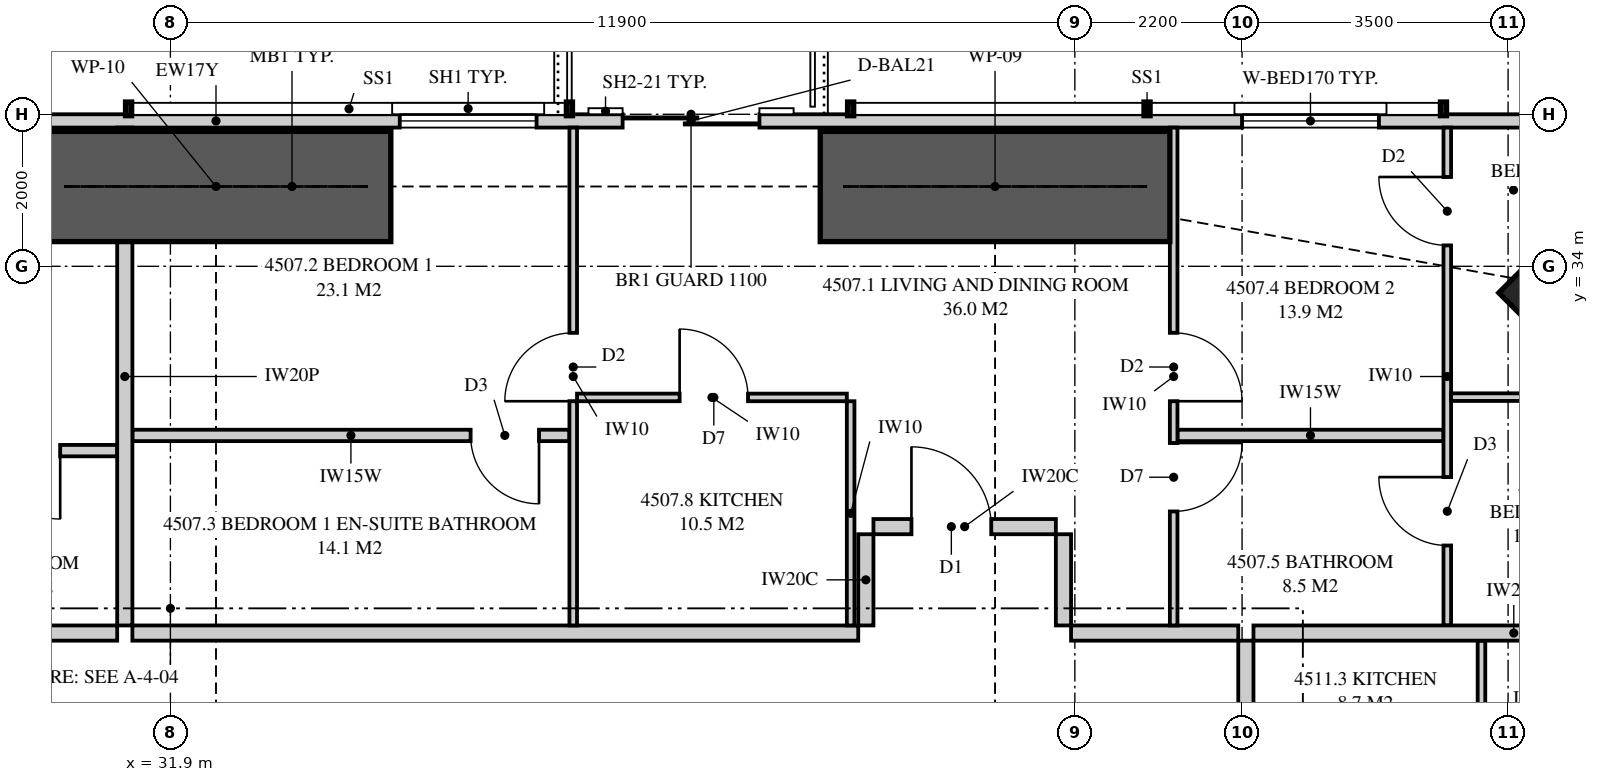
"""IFC4 building model, lengths in metres.
Left out: names, types, materials, properties, quantities, classifications, styles, units other than length and angle.
Written with IfcOpenShell. Run it as: python <this file> out.ifc"""

import sys

from ifc_helpers import new_model, si_unit, direction, frame, frame_2d, origin, origin_2d, place, context, subcontext, project, spatial, polyline, rectangle, outline, extrude, element, fill, save


model = new_model("IFC4")
c1 = context("Model", 3, precision=1e-05, world=origin(), true_north=direction((0.0, 1.0)))
c2 = subcontext(c1, "Body", "Model", "MODEL_VIEW")
j1 = project(units=[si_unit("LENGTHUNIT", "METRE"), si_unit("PLANEANGLEUNIT", "RADIAN")], contexts=[c1])
p1 = place(None, origin())
s1 = spatial("IfcSite", under=j1, at=p1, CompositionType="ELEMENT")
p2 = place(p1, origin())
s2 = spatial("IfcBuilding", under=s1, at=p2, CompositionType="ELEMENT")
p3 = place(p2, frame((0.0, 0.0, 167.75)))
s3 = spatial("IfcBuildingStorey", under=s2, at=p3, CompositionType="ELEMENT", Elevation=167.75)
p4 = place(p3, frame((50.652, 33.652, 0.0), z_axis=(0.0, 0.0, 1.0), x_axis=(0.707106781187, 0.707106781187, 0.0)))
e1 = element("IfcColumn", 1, at=p4, inside=s3, PredefinedType="COLUMN", context=c2, shape_type="SweptSolid", body=[
    extrude(rectangle(XDim=1.8, YDim=1.8, at=origin_2d()), origin(), (0.0, 0.0, 1.0), 3.35),
])
p5 = place(p3, frame((49.949, 35.913, 0.0), z_axis=(0.0, 0.0, 1.0), x_axis=(-1.0, 0.0, 0.0)))
e2 = element("IfcWall", 2, at=p5, inside=s3, PredefinedType="SOLIDWALL", context=c2, shape_type="SweptSolid", body=[
    extrude(outline(polyline([(0.0, 0.0), (34.897, 0.0), (34.897, 3.11), (27.91, 3.11), (27.91, 2.15), (27.836, 2.15), (27.836, 3.11), (27.699, 3.11), (27.699, 2.15), (7.199, 2.15), (7.199, 3.11), (7.062, 3.11), (7.062, 2.15), (6.987, 2.15), (6.987, 3.11), (0.0, 3.11), (0.0, 0.0)])), frame((0.0, 0.087, 0.0), z_axis=(0.0, -1.0, 0.0), x_axis=(1.0, 0.0, 0.0)), (0.0, 0.0, 1.0), 0.175),
])
p6 = place(p5, frame((2.149, 0.0, 0.4)))
e3 = element("IfcOpeningElement", 3, at=p6, cuts=e2, PredefinedType="OPENING", context=c2, shape_type="SweptSolid", body=[
    extrude(rectangle(XDim=1.8, YDim=1.7, at=frame_2d((0.9, 0.85))), frame((0.0, 0.097, 0.0), z_axis=(0.0, -1.0, 0.0), x_axis=(1.0, 0.0, 0.0)), (0.0, 0.0, 1.0), 0.195),
])
p7 = place(p5, frame((10.299, 0.0, 0.0)))
e4 = element("IfcOpeningElement", 4, at=p7, cuts=e2, PredefinedType="OPENING", context=c2, shape_type="SweptSolid", body=[
    extrude(rectangle(XDim=1.8, YDim=2.1, at=frame_2d((0.9, 1.05))), frame((0.0, 0.097, 0.0), z_axis=(0.0, -1.0, 0.0), x_axis=(1.0, 0.0, 0.0)), (0.0, 0.0, 1.0), 0.195),
])
p8 = place(p5, frame((13.231, 0.0, 0.4)))
e5 = element("IfcOpeningElement", 5, at=p8, cuts=e2, PredefinedType="OPENING", context=c2, shape_type="SweptSolid", body=[
    extrude(rectangle(XDim=1.8, YDim=1.7, at=frame_2d((0.9, 0.85))), frame((0.0, 0.097, 0.0), z_axis=(0.0, -1.0, 0.0), x_axis=(1.0, 0.0, 0.0)), (0.0, 0.0, 1.0), 0.195),
])
p9 = place(p5, frame((22.699, 0.0, 0.0)))
e6 = element("IfcOpeningElement", 6, at=p9, cuts=e2, PredefinedType="OPENING", context=c2, shape_type="SweptSolid", body=[
    extrude(rectangle(XDim=1.8, YDim=2.1, at=frame_2d((0.9, 1.05))), frame((0.0, 0.097, 0.0), z_axis=(0.0, -1.0, 0.0), x_axis=(1.0, 0.0, 0.0)), (0.0, 0.0, 1.0), 0.195),
])
p10 = place(p5, frame((19.853, 0.0, 0.4)))
e7 = element("IfcOpeningElement", 7, at=p10, cuts=e2, PredefinedType="OPENING", context=c2, shape_type="SweptSolid", body=[
    extrude(rectangle(XDim=2.4, YDim=1.7, at=frame_2d((1.2, 0.85))), frame((0.0, 0.097, 0.0), z_axis=(0.0, -1.0, 0.0), x_axis=(1.0, 0.0, 0.0)), (0.0, 0.0, 1.0), 0.195),
])
p11 = place(p5, frame((30.104, 0.0, 0.4)))
e8 = element("IfcOpeningElement", 8, at=p11, cuts=e2, PredefinedType="OPENING", context=c2, shape_type="SweptSolid", body=[
    extrude(rectangle(XDim=2.4, YDim=1.7, at=frame_2d((1.2, 0.85))), frame((0.0, 0.097, 0.0), z_axis=(0.0, -1.0, 0.0), x_axis=(1.0, 0.0, 0.0)), (0.0, 0.0, 1.0), 0.195),
])
p12 = place(p3, frame((31.3, 35.825, 0.0), z_axis=(0.0, 0.0, 1.0), x_axis=(0.0, -1.0, 0.0)))
e9 = element("IfcWall", 9, at=p12, inside=s3, PredefinedType="PARTITIONING", context=c2, shape_type="SweptSolid", body=[
    extrude(outline(polyline([(0.529, 2.15), (0.0, 2.15), (0.0, 0.0), (0.529, 0.0), (0.529, 0.542), (1.021, 0.542), (1.021, 0.0), (6.55, 0.0), (6.55, 3.11), (1.685, 3.11), (1.685, 2.15), (1.021, 2.15), (1.021, 1.609), (0.529, 1.609), (0.529, 2.15)])), frame((0.0, 0.1, 0.0), z_axis=(0.0, -1.0, 0.0), x_axis=(1.0, 0.0, 0.0)), (0.0, 0.0, 1.0), 0.2),
])
p13 = place(p3, frame((28.775, 31.575, 0.0), z_axis=(0.0, 0.0, 1.0), x_axis=(1.0, 0.0, 0.0)))
e10 = element("IfcWall", 10, at=p13, inside=s3, PredefinedType="PLUMBINGWALL", context=c2, shape_type="SweptSolid", body=[
    extrude(rectangle(XDim=2.425, YDim=0.15, at=frame_2d((1.212, 0.0))), origin(), (0.0, 0.0, 1.0), 3.11),
])
p14 = place(p13, frame((0.775, 0.0, 0.0)))
e11 = element("IfcOpeningElement", 11, at=p14, cuts=e10, PredefinedType="OPENING", context=c2, shape_type="SweptSolid", body=[
    extrude(rectangle(XDim=0.9, YDim=2.1, at=frame_2d((0.45, 1.05))), frame((0.0, 0.085, 0.0), z_axis=(0.0, -1.0, 0.0), x_axis=(1.0, 0.0, 0.0)), (0.0, 0.0, 1.0), 0.17),
])
p15 = place(p3, frame((31.4, 29.175, 0.0), z_axis=(0.0, 0.0, 1.0), x_axis=(1.0, 0.0, 0.0)))
e12 = element("IfcWall", 12, at=p15, inside=s3, PredefinedType="PARTITIONING", context=c2, shape_type="SweptSolid", body=[
    extrude(outline(polyline([(0.0, 0.0), (9.55, 0.0), (9.55, 3.11), (1.437, 3.11), (1.437, 2.541), (0.763, 2.541), (0.763, 3.11), (0.0, 3.11), (0.0, 0.0)])), frame((0.0, 0.1, 0.0), z_axis=(0.0, -1.0, 0.0), x_axis=(1.0, 0.0, 0.0)), (0.0, 0.0, 1.0), 0.2),
])
p16 = place(p3, frame((37.2, 35.825, 0.0), z_axis=(0.0, 0.0, 1.0), x_axis=(0.0, -1.0, 0.0)))
e13 = element("IfcWall", 13, at=p16, inside=s3, PredefinedType="PARTITIONING", context=c2, shape_type="SweptSolid", body=[
    extrude(outline(polyline([(0.0, 0.0), (6.55, 0.0), (6.55, 3.11), (1.635, 3.11), (1.635, 2.15), (0.0, 2.15), (0.0, 3.11), (0.0, 0.0)])), frame((0.0, 0.05, 0.0), z_axis=(0.0, -1.0, 0.0), x_axis=(1.0, 0.0, 0.0)), (0.0, 0.0, 1.0), 0.1),
])
p17 = place(p16, frame((2.7, 0.0, 0.0)))
e14 = element("IfcOpeningElement", 14, at=p17, cuts=e13, PredefinedType="OPENING", context=c2, shape_type="SweptSolid", body=[
    extrude(rectangle(XDim=0.9, YDim=2.1, at=frame_2d((0.45, 1.05))), frame((0.0, 0.06, 0.0), z_axis=(0.0, -1.0, 0.0), x_axis=(1.0, 0.0, 0.0)), (0.0, 0.0, 1.0), 0.12),
])
p18 = place(p3, frame((45.1, 35.825, 0.0), z_axis=(0.0, 0.0, 1.0), x_axis=(0.0, -1.0, 0.0)))
e15 = element("IfcWall", 15, at=p18, inside=s3, PredefinedType="PARTITIONING", context=c2, shape_type="SweptSolid", body=[
    extrude(outline(polyline([(0.0, 0.0), (6.55, 0.0), (6.55, 3.11), (2.064, 3.11), (2.064, 2.15), (0.318, 2.15), (0.318, 3.11), (0.0, 3.11), (0.0, 0.0)])), frame((0.0, 0.05, 0.0), z_axis=(0.0, -1.0, 0.0), x_axis=(1.0, 0.0, 0.0)), (0.0, 0.0, 1.0), 0.1),
])
p19 = place(p18, frame((2.7, 0.0, 0.0)))
e16 = element("IfcOpeningElement", 16, at=p19, cuts=e15, PredefinedType="OPENING", context=c2, shape_type="SweptSolid", body=[
    extrude(rectangle(XDim=0.9, YDim=2.1, at=frame_2d((0.45, 1.05))), frame((0.0, 0.06, 0.0), z_axis=(0.0, -1.0, 0.0), x_axis=(1.0, 0.0, 0.0)), (0.0, 0.0, 1.0), 0.12),
])
p20 = place(p18, frame((4.15, 0.0, 0.0)))
e17 = element("IfcOpeningElement", 17, at=p20, cuts=e15, PredefinedType="OPENING", context=c2, shape_type="SweptSolid", body=[
    extrude(rectangle(XDim=0.9, YDim=2.1, at=frame_2d((0.45, 1.05))), frame((0.0, 0.06, 0.0), z_axis=(0.0, -1.0, 0.0), x_axis=(1.0, 0.0, 0.0)), (0.0, 0.0, 1.0), 0.12),
])
p21 = place(p3, frame((48.7, 35.825, 0.0), z_axis=(0.0, 0.0, 1.0), x_axis=(0.0, -1.0, 0.0)))
e18 = element("IfcWall", 18, at=p21, inside=s3, PredefinedType="PARTITIONING", context=c2, shape_type="SweptSolid", body=[
    extrude(outline(polyline([(0.0, 0.0), (6.55, 0.0), (6.55, 3.11), (2.701, 3.11), (2.701, 2.15), (0.955, 2.15), (0.955, 3.11), (0.0, 3.11), (0.0, 0.0)])), frame((0.0, 0.05, 0.0), z_axis=(0.0, -1.0, 0.0), x_axis=(1.0, 0.0, 0.0)), (0.0, 0.0, 1.0), 0.1),
])
p22 = place(p21, frame((0.65, 0.0, 0.0)))
e19 = element("IfcOpeningElement", 19, at=p22, cuts=e18, PredefinedType="OPENING", context=c2, shape_type="SweptSolid", body=[
    extrude(rectangle(XDim=0.9, YDim=2.1, at=frame_2d((0.45, 1.05))), frame((0.0, 0.06, 0.0), z_axis=(0.0, -1.0, 0.0), x_axis=(1.0, 0.0, 0.0)), (0.0, 0.0, 1.0), 0.12),
])
p23 = place(p21, frame((4.598, 0.0, 0.0)))
e20 = element("IfcOpeningElement", 20, at=p23, cuts=e18, PredefinedType="OPENING", context=c2, shape_type="SweptSolid", body=[
    extrude(rectangle(XDim=0.9, YDim=2.1, at=frame_2d((0.45, 1.05))), frame((0.0, 0.06, 0.0), z_axis=(0.0, -1.0, 0.0), x_axis=(1.0, 0.0, 0.0)), (0.0, 0.0, 1.0), 0.12),
])
p24 = place(p3, frame((31.4, 31.775, 0.0), z_axis=(0.0, 0.0, 1.0), x_axis=(1.0, 0.0, 0.0)))
e21 = element("IfcWall", 21, at=p24, inside=s3, PredefinedType="PLUMBINGWALL", context=c2, shape_type="SweptSolid", body=[
    extrude(outline(polyline([(0.0, 0.0), (5.75, 0.0), (5.75, 3.11), (1.412, 3.11), (1.412, 2.541), (0.788, 2.541), (0.788, 3.11), (0.0, 3.11), (0.0, 0.0)])), frame((0.0, 0.075, 0.0), z_axis=(0.0, -1.0, 0.0), x_axis=(1.0, 0.0, 0.0)), (0.0, 0.0, 1.0), 0.15),
])
p25 = place(p24, frame((4.45, 0.0, 0.0)))
e22 = element("IfcOpeningElement", 22, at=p25, cuts=e21, PredefinedType="OPENING", context=c2, shape_type="SweptSolid", body=[
    extrude(rectangle(XDim=0.9, YDim=2.1, at=frame_2d((0.45, 1.05))), frame((0.0, 0.085, 0.0), z_axis=(0.0, -1.0, 0.0), x_axis=(1.0, 0.0, 0.0)), (0.0, 0.0, 1.0), 0.17),
])
p26 = place(p3, frame((45.15, 31.775, 0.0), z_axis=(0.0, 0.0, 1.0), x_axis=(1.0, 0.0, 0.0)))
e23 = element("IfcWall", 23, at=p26, inside=s3, PredefinedType="PLUMBINGWALL", context=c2, shape_type="SweptSolid", body=[
    extrude(rectangle(XDim=3.5, YDim=0.15, at=frame_2d((1.75, 0.0))), origin(), (0.0, 0.0, 1.0), 3.11),
])
p27 = place(p3, frame((48.75, 32.279, 0.0), z_axis=(0.0, 0.0, 1.0), x_axis=(1.0, 0.0, 0.0)))
e24 = element("IfcWall", 24, at=p27, inside=s3, PredefinedType="PARTITIONING", context=c2, shape_type="SweptSolid", body=[
    extrude(outline(polyline([(0.0, 0.0), (4.25, 0.0), (4.25, 3.11), (2.995, 3.11), (2.995, 2.15), (1.252, 2.15), (1.252, 3.11), (0.0, 3.11), (0.0, 0.0)])), frame((0.0, 0.05, 0.0), z_axis=(0.0, -1.0, 0.0), x_axis=(1.0, 0.0, 0.0)), (0.0, 0.0, 1.0), 0.1),
])
p28 = place(p27, frame((2.9, 0.0, 0.0)))
e25 = element("IfcOpeningElement", 25, at=p28, cuts=e24, PredefinedType="OPENING", context=c2, shape_type="SweptSolid", body=[
    extrude(rectangle(XDim=0.9, YDim=2.1, at=frame_2d((0.45, 1.05))), frame((0.0, 0.06, 0.0), z_axis=(0.0, -1.0, 0.0), x_axis=(1.0, 0.0, 0.0)), (0.0, 0.0, 1.0), 0.12),
])
p29 = place(p3, frame((37.25, 32.275, 0.0), z_axis=(0.0, 0.0, 1.0), x_axis=(1.0, 0.0, 0.0)))
e26 = element("IfcWall", 26, at=p29, inside=s3, PredefinedType="PARTITIONING", context=c2, shape_type="SweptSolid", body=[
    extrude(rectangle(XDim=3.55, YDim=0.1, at=frame_2d((1.775, 0.0))), origin(), (0.0, 0.0, 1.0), 3.11),
])
p30 = place(p29, frame((1.35, 0.0, 0.0)))
e27 = element("IfcOpeningElement", 27, at=p30, cuts=e26, PredefinedType="OPENING", context=c2, shape_type="SweptSolid", body=[
    extrude(rectangle(XDim=0.9, YDim=2.1, at=frame_2d((0.45, 1.05))), frame((0.0, 0.06, 0.0), z_axis=(0.0, -1.0, 0.0), x_axis=(1.0, 0.0, 0.0)), (0.0, 0.0, 1.0), 0.12),
])
p31 = place(p3, frame((40.85, 32.225, 0.0), z_axis=(0.0, 0.0, 1.0), x_axis=(0.0, -1.0, 0.0)))
e28 = element("IfcWall", 28, at=p31, inside=s3, PredefinedType="PARTITIONING", context=c2, shape_type="SweptSolid", body=[
    extrude(rectangle(XDim=2.95, YDim=0.1, at=frame_2d((1.475, 0.0))), origin(), (0.0, 0.0, 1.0), 3.11),
])
p32 = place(p3, frame((46.15, 29.175, 0.0), z_axis=(0.0, 0.0, 1.0), x_axis=(1.0, 0.0, 0.0)))
e29 = element("IfcWall", 29, at=p32, inside=s3, PredefinedType="PARTITIONING", context=c2, shape_type="SweptSolid", body=[
    extrude(outline(polyline([(0.0, 0.0), (6.85, 0.0), (6.85, 3.11), (6.147, 3.11), (6.147, 2.15), (4.303, 2.15), (4.303, 3.11), (0.0, 3.11), (0.0, 0.0)])), frame((0.0, 0.1, 0.0), z_axis=(0.0, -1.0, 0.0), x_axis=(1.0, 0.0, 0.0)), (0.0, 0.0, 1.0), 0.2),
])
p33 = place(p3, frame((46.05, 21.75, 0.0), z_axis=(0.0, 0.0, 1.0), x_axis=(0.0, 1.0, 0.0)))
e30 = element("IfcWall", 30, at=p33, inside=s3, PredefinedType="PARTITIONING", context=c2, shape_type="SweptSolid", body=[
    extrude(outline(polyline([(0.0, 0.0), (7.325, 0.0), (7.325, 3.11), (3.587, 3.11), (3.587, 2.541), (2.913, 2.541), (2.913, 3.11), (0.0, 3.11), (0.0, 0.0)])), frame((0.0, 0.1, 0.0), z_axis=(0.0, -1.0, 0.0), x_axis=(1.0, 0.0, 0.0)), (0.0, 0.0, 1.0), 0.2),
])
p34 = place(p33, frame((3.163, 0.0, 0.0)))
e31 = element("IfcOpeningElement", 31, at=p34, cuts=e30, PredefinedType="OPENING", context=c2, shape_type="SweptSolid", body=[
    extrude(rectangle(XDim=1.05, YDim=2.2, at=frame_2d((0.525, 1.1))), frame((0.0, 0.11, 0.0), z_axis=(0.0, -1.0, 0.0), x_axis=(1.0, 0.0, 0.0)), (0.0, 0.0, 1.0), 0.22),
])
p35 = place(p3, frame((49.15, 26.125, 0.0), z_axis=(0.0, 0.0, 1.0), x_axis=(0.0, 1.0, 0.0)))
e32 = element("IfcWall", 32, at=p35, inside=s3, PredefinedType="PARTITIONING", context=c2, shape_type="SweptSolid", body=[
    extrude(rectangle(XDim=2.95, YDim=0.1, at=frame_2d((1.475, 0.0))), origin(), (0.0, 0.0, 1.0), 3.11),
])
p36 = place(p35, frame((1.0, 0.0, 0.0)))
e33 = element("IfcOpeningElement", 33, at=p36, cuts=e32, PredefinedType="OPENING", context=c2, shape_type="SweptSolid", body=[
    extrude(rectangle(XDim=0.9, YDim=2.1, at=frame_2d((0.45, 1.05))), frame((0.0, 0.06, 0.0), z_axis=(0.0, -1.0, 0.0), x_axis=(1.0, 0.0, 0.0)), (0.0, 0.0, 1.0), 0.12),
])
p37 = place(p3, frame((28.5, 29.175, 0.0), z_axis=(0.0, 0.0, 1.0), x_axis=(1.0, 0.0, 0.0)))
e34 = element("IfcWall", 34, at=p37, inside=s3, PredefinedType="PARTITIONING", context=c2, shape_type="SweptSolid", body=[
    extrude(rectangle(XDim=2.7, YDim=0.2, at=frame_2d((1.35, 0.0))), origin(), (0.0, 0.0, 1.0), 3.11),
])
p38 = place(p3, frame((43.75, 29.175, 0.0), z_axis=(0.0, 0.0, 1.0), x_axis=(1.0, 0.0, 0.0)))
e35 = element("IfcWall", 35, at=p38, inside=s3, PredefinedType="PARTITIONING", context=c2, shape_type="SweptSolid", body=[
    extrude(rectangle(XDim=2.2, YDim=0.2, at=frame_2d((1.1, 0.0))), origin(), (0.0, 0.0, 1.0), 3.11),
])
p39 = place(p3, frame((41.15, 30.575, 0.0), z_axis=(0.0, 0.0, 1.0), x_axis=(1.0, 0.0, 0.0)))
e36 = element("IfcWall", 36, at=p39, inside=s3, PredefinedType="PARTITIONING", context=c2, shape_type="SweptSolid", body=[
    extrude(outline(polyline([(0.0, 0.0), (2.4, 0.0), (2.4, 3.11), (1.938, 3.11), (1.938, 2.541), (1.263, 2.541), (1.263, 3.11), (0.0, 3.11), (0.0, 0.0)])), frame((0.0, 0.1, 0.0), z_axis=(0.0, -1.0, 0.0), x_axis=(1.0, 0.0, 0.0)), (0.0, 0.0, 1.0), 0.2),
])
p40 = place(p39, frame((0.5, 0.0, 0.0)))
e37 = element("IfcOpeningElement", 37, at=p40, cuts=e36, PredefinedType="OPENING", context=c2, shape_type="SweptSolid", body=[
    extrude(rectangle(XDim=1.05, YDim=2.2, at=frame_2d((0.525, 1.1))), frame((0.0, 0.11, 0.0), z_axis=(0.0, -1.0, 0.0), x_axis=(1.0, 0.0, 0.0)), (0.0, 0.0, 1.0), 0.22),
])
for number, where, z_axis, x_axis in (
    (38, (41.05, 29.275, 0.0), (0.0, 0.0, 1.0), (0.0, 1.0, 0.0)),
    (39, (43.65, 29.275, 0.0), (0.0, 0.0, 1.0), (0.0, 1.0, 0.0)),
):
    element("IfcWall", number, at=place(p3, frame(where, z_axis=z_axis, x_axis=x_axis)), inside=s3, PredefinedType="PARTITIONING", context=c2, shape_type="SweptSolid", body=[
        extrude(rectangle(XDim=1.2, YDim=0.2, at=frame_2d((0.6, 0.0))), origin(), (0.0, 0.0, 1.0), 3.11),
    ])
for number, where, z_axis, x_axis in (
    (40, (40.45, 35.05, 0.0), (0.0, 0.0, 1.0), (1.0, 0.0, 0.0)),
    (41, (30.2, 35.05, 0.0), (0.0, 0.0, 1.0), (1.0, 0.0, 0.0)),
):
    element("IfcWall", number, at=place(p3, frame(where, z_axis=z_axis, x_axis=x_axis)), inside=s3, PredefinedType="SHEAR", context=c2, shape_type="SweptSolid", body=[
        extrude(rectangle(XDim=4.6, YDim=1.45, at=frame_2d((2.3, 0.0))), origin(), (0.0, 0.0, 1.0), 3.35),
    ])
p41 = place(p6, origin())
e42 = element("IfcWindow", 42, at=p41, inside=s3, PartitioningType="SINGLE_PANEL", PredefinedType="WINDOW", context=c2, shape_type="SweptSolid", body=[
    extrude(rectangle(XDim=1.8, YDim=1.7, at=frame_2d((0.9, 0.85))), frame((0.0, 0.03, 0.0), z_axis=(0.0, -1.0, 0.0), x_axis=(1.0, 0.0, 0.0)), (0.0, 0.0, 1.0), 0.06),
])
fill(e3, e42)
p42 = place(p7, origin())
e43 = element("IfcDoor", 43, at=p42, inside=s3, OperationType="SLIDING_TO_LEFT", PredefinedType="DOOR", context=c2, shape_type="SweptSolid", body=[
    extrude(rectangle(XDim=1.8, YDim=2.1, at=frame_2d((0.9, 1.05))), frame((0.0, 0.025, 0.0), z_axis=(0.0, -1.0, 0.0), x_axis=(1.0, 0.0, 0.0)), (0.0, 0.0, 1.0), 0.05),
])
fill(e4, e43)
p43 = place(p8, origin())
e44 = element("IfcWindow", 44, at=p43, inside=s3, PartitioningType="SINGLE_PANEL", PredefinedType="WINDOW", context=c2, shape_type="SweptSolid", body=[
    extrude(rectangle(XDim=1.8, YDim=1.7, at=frame_2d((0.9, 0.85))), frame((0.0, 0.03, 0.0), z_axis=(0.0, -1.0, 0.0), x_axis=(1.0, 0.0, 0.0)), (0.0, 0.0, 1.0), 0.06),
])
fill(e5, e44)
p44 = place(p14, frame((0.9, 0.0, 0.0), z_axis=(0.0, 0.0, 1.0), x_axis=(-1.0, 0.0, 0.0)))
e45 = element("IfcDoor", 45, at=p44, inside=s3, OperationType="SINGLE_SWING_LEFT", PredefinedType="DOOR", context=c2, shape_type="SweptSolid", body=[
    extrude(rectangle(XDim=0.9, YDim=2.1, at=frame_2d((0.45, 1.05))), frame((0.0, 0.025, 0.0), z_axis=(0.0, -1.0, 0.0), x_axis=(1.0, 0.0, 0.0)), (0.0, 0.0, 1.0), 0.05),
])
fill(e11, e45)
p45 = place(p40, origin())
e46 = element("IfcDoor", 46, at=p45, inside=s3, OperationType="SINGLE_SWING_LEFT", PredefinedType="DOOR", context=c2, shape_type="SweptSolid", body=[
    extrude(rectangle(XDim=1.05, YDim=2.2, at=frame_2d((0.525, 1.1))), frame((0.0, 0.025, 0.0), z_axis=(0.0, -1.0, 0.0), x_axis=(1.0, 0.0, 0.0)), (0.0, 0.0, 1.0), 0.05),
])
fill(e37, e46)
p46 = place(p17, frame((0.9, 0.0, 0.0), z_axis=(0.0, 0.0, 1.0), x_axis=(-1.0, 0.0, 0.0)))
e47 = element("IfcDoor", 47, at=p46, inside=s3, OperationType="SINGLE_SWING_LEFT", PredefinedType="DOOR", context=c2, shape_type="SweptSolid", body=[
    extrude(rectangle(XDim=0.9, YDim=2.1, at=frame_2d((0.45, 1.05))), frame((0.0, 0.025, 0.0), z_axis=(0.0, -1.0, 0.0), x_axis=(1.0, 0.0, 0.0)), (0.0, 0.0, 1.0), 0.05),
])
fill(e14, e47)
p47 = place(p25, frame((0.9, 0.0, 0.0), z_axis=(0.0, 0.0, 1.0), x_axis=(-1.0, 0.0, 0.0)))
e48 = element("IfcDoor", 48, at=p47, inside=s3, OperationType="SINGLE_SWING_LEFT", PredefinedType="DOOR", context=c2, shape_type="SweptSolid", body=[
    extrude(rectangle(XDim=0.9, YDim=2.1, at=frame_2d((0.45, 1.05))), frame((0.0, 0.025, 0.0), z_axis=(0.0, -1.0, 0.0), x_axis=(1.0, 0.0, 0.0)), (0.0, 0.0, 1.0), 0.05),
])
fill(e22, e48)
p48 = place(p19, origin())
e49 = element("IfcDoor", 49, at=p48, inside=s3, OperationType="SINGLE_SWING_RIGHT", PredefinedType="DOOR", context=c2, shape_type="SweptSolid", body=[
    extrude(rectangle(XDim=0.9, YDim=2.1, at=frame_2d((0.45, 1.05))), frame((0.0, 0.025, 0.0), z_axis=(0.0, -1.0, 0.0), x_axis=(1.0, 0.0, 0.0)), (0.0, 0.0, 1.0), 0.05),
])
fill(e16, e49)
p49 = place(p20, origin())
e50 = element("IfcDoor", 50, at=p49, inside=s3, OperationType="SINGLE_SWING_LEFT", PredefinedType="DOOR", context=c2, shape_type="SweptSolid", body=[
    extrude(rectangle(XDim=0.9, YDim=2.1, at=frame_2d((0.45, 1.05))), frame((0.0, 0.025, 0.0), z_axis=(0.0, -1.0, 0.0), x_axis=(1.0, 0.0, 0.0)), (0.0, 0.0, 1.0), 0.05),
])
fill(e17, e50)
p50 = place(p22, frame((0.9, 0.0, 0.0), z_axis=(0.0, 0.0, 1.0), x_axis=(-1.0, 0.0, 0.0)))
e51 = element("IfcDoor", 51, at=p50, inside=s3, OperationType="SINGLE_SWING_RIGHT", PredefinedType="DOOR", context=c2, shape_type="SweptSolid", body=[
    extrude(rectangle(XDim=0.9, YDim=2.1, at=frame_2d((0.45, 1.05))), frame((0.0, 0.025, 0.0), z_axis=(0.0, -1.0, 0.0), x_axis=(1.0, 0.0, 0.0)), (0.0, 0.0, 1.0), 0.05),
])
fill(e19, e51)
p51 = place(p23, frame((0.9, 0.0, 0.0), z_axis=(0.0, 0.0, 1.0), x_axis=(-1.0, 0.0, 0.0)))
e52 = element("IfcDoor", 52, at=p51, inside=s3, OperationType="SINGLE_SWING_RIGHT", PredefinedType="DOOR", context=c2, shape_type="SweptSolid", body=[
    extrude(rectangle(XDim=0.9, YDim=2.1, at=frame_2d((0.45, 1.05))), frame((0.0, 0.025, 0.0), z_axis=(0.0, -1.0, 0.0), x_axis=(1.0, 0.0, 0.0)), (0.0, 0.0, 1.0), 0.05),
])
fill(e20, e52)
p52 = place(p30, origin())
e53 = element("IfcDoor", 53, at=p52, inside=s3, OperationType="SINGLE_SWING_LEFT", PredefinedType="DOOR", context=c2, shape_type="SweptSolid", body=[
    extrude(rectangle(XDim=0.9, YDim=2.1, at=frame_2d((0.45, 1.05))), frame((0.0, 0.025, 0.0), z_axis=(0.0, -1.0, 0.0), x_axis=(1.0, 0.0, 0.0)), (0.0, 0.0, 1.0), 0.05),
])
fill(e27, e53)
save(model, sys.argv[1])
